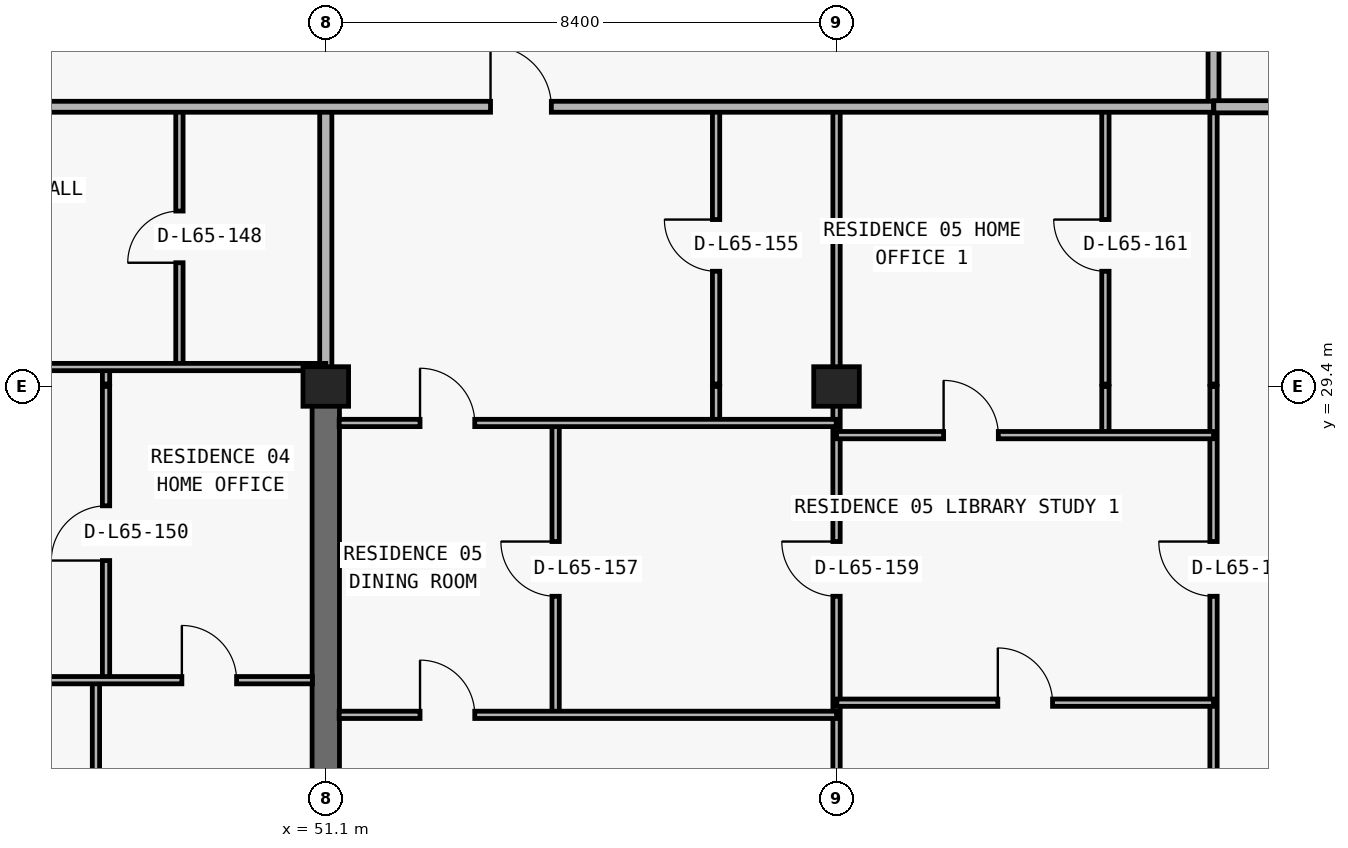
"""IFC4 building model, lengths in metres.
Left out: names, types, materials, properties, quantities, classifications, styles, units other than length and angle.
Written with IfcOpenShell. Run it as: python <this file> out.ifc"""

import sys

from ifc_helpers import new_model, si_unit, direction, frame, frame_2d, origin, origin_2d, place, context, subcontext, project, spatial, rectangle, extrude, element, fill, save


model = new_model("IFC4")
c1 = context("Model", 3, precision=1e-05, world=origin(), true_north=direction((0.0, 1.0)))
c2 = subcontext(c1, "Body", "Model", "MODEL_VIEW")
j1 = project(units=[si_unit("LENGTHUNIT", "METRE"), si_unit("PLANEANGLEUNIT", "RADIAN")], contexts=[c1])
p1 = place(None, origin())
s1 = spatial("IfcSite", under=j1, at=p1, CompositionType="ELEMENT")
p2 = place(p1, origin())
s2 = spatial("IfcBuilding", under=s1, at=p2, CompositionType="ELEMENT")
p3 = place(p2, frame((0.0, 0.0, 233.1)))
s3 = spatial("IfcBuildingStorey", under=s2, at=p3, CompositionType="ELEMENT", Elevation=233.1)
for number, where, z_axis, x_axis in (
    (1, (51.1, 29.4, 0.0), (0.0, 0.0, 1.0), (1.0, 0.0, 0.0)),
    (2, (59.5, 29.4, 0.0), (0.0, 0.0, 1.0), (1.0, 0.0, 0.0)),
):
    element("IfcColumn", number, at=place(p3, frame(where, z_axis=z_axis, x_axis=x_axis)), inside=s3, PredefinedType="COLUMN", context=c2, shape_type="SweptSolid", body=[
        extrude(rectangle(XDim=0.75, YDim=0.65, at=origin_2d()), origin(), (0.0, 0.0, 1.0), 3.05),
    ])
p4 = place(p3, frame((51.1, 20.8, 0.0), z_axis=(0.0, 0.0, 1.0), x_axis=(0.0, 1.0, 0.0)))
e3 = element("IfcWall", 3, at=p4, inside=s3, PredefinedType="SHEAR", context=c2, shape_type="SweptSolid", body=[
    extrude(rectangle(XDim=8.6, YDim=0.45, at=frame_2d((4.3, 0.0))), origin(), (0.0, 0.0, 1.0), 3.05),
])
p5 = place(p3, frame((47.32, 13.34, 0.0), z_axis=(0.0, 0.0, 1.0), x_axis=(0.0, 1.0, 0.0)))
e4 = element("IfcWall", 4, at=p5, inside=s3, PredefinedType="PARTITIONING", context=c2, shape_type="SweptSolid", body=[
    extrude(rectangle(XDim=11.23, YDim=0.12, at=frame_2d((5.615, 0.0))), origin(), (0.0, 0.0, 1.0), 3.05),
])
p6 = place(p3, frame((47.486, 24.575, 0.0), z_axis=(0.0, 0.0, 1.0), x_axis=(0.0, 1.0, 0.0)))
e5 = element("IfcWall", 5, at=p6, inside=s3, PredefinedType="PARTITIONING", context=c2, shape_type="SweptSolid", body=[
    extrude(rectangle(XDim=4.825, YDim=0.12, at=frame_2d((2.413, 0.0))), origin(), (0.0, 0.0, 1.0), 3.05),
])
p7 = place(p6, frame((1.962, 0.0, 0.0)))
e6 = element("IfcOpeningElement", 6, at=p7, cuts=e5, PredefinedType="OPENING", context=c2, shape_type="SweptSolid", body=[
    extrude(rectangle(XDim=0.9, YDim=2.15, at=frame_2d((0.45, 1.075))), frame((0.0, 0.07, 0.0), z_axis=(0.0, -1.0, 0.0), x_axis=(1.0, 0.0, 0.0)), (0.0, 0.0, 1.0), 0.14),
])
p8 = place(p3, frame((47.486, 29.44, 0.0), z_axis=(0.0, 0.0, 1.0), x_axis=(0.0, 1.0, 0.0)))
e7 = element("IfcWall", 7, at=p8, inside=s3, PredefinedType="PARTITIONING", context=c2, shape_type="SweptSolid", body=[
    extrude(rectangle(XDim=0.28, YDim=0.12, at=frame_2d((0.14, 0.0))), origin(), (0.0, 0.0, 1.0), 3.05),
])
p9 = place(p3, frame((48.693, 29.72, 0.0), z_axis=(0.0, 0.0, 1.0), x_axis=(0.0, 1.0, 0.0)))
e8 = element("IfcWall", 8, at=p9, inside=s3, PredefinedType="PARTITIONING", context=c2, shape_type="SweptSolid", body=[
    extrude(rectangle(XDim=4.28, YDim=0.12, at=frame_2d((2.14, 0.0))), origin(), (0.0, 0.0, 1.0), 3.05),
])
p10 = place(p9, frame((1.715, 0.0, 0.0)))
e9 = element("IfcOpeningElement", 9, at=p10, cuts=e8, PredefinedType="OPENING", context=c2, shape_type="SweptSolid", body=[
    extrude(rectangle(XDim=0.85, YDim=2.1, at=frame_2d((0.425, 1.05))), frame((0.0, 0.07, 0.0), z_axis=(0.0, -1.0, 0.0), x_axis=(1.0, 0.0, 0.0)), (0.0, 0.0, 1.0), 0.14),
])
p11 = place(p3, frame((51.1, 29.44, 0.0), z_axis=(0.0, 0.0, 1.0), x_axis=(0.0, 1.0, 0.0)))
e10 = element("IfcWall", 10, at=p11, inside=s3, PredefinedType="PARTITIONING", context=c2, shape_type="SweptSolid", body=[
    extrude(rectangle(XDim=4.56, YDim=0.2, at=frame_2d((2.28, 0.0))), origin(), (0.0, 0.0, 1.0), 2.335),
])
p12 = place(p3, frame((54.88, 24.0, 0.0), z_axis=(0.0, 0.0, 1.0), x_axis=(0.0, 1.0, 0.0)))
e11 = element("IfcWall", 11, at=p12, inside=s3, PredefinedType="PARTITIONING", context=c2, shape_type="SweptSolid", body=[
    extrude(rectangle(XDim=4.8, YDim=0.12, at=frame_2d((2.4, 0.0))), origin(), (0.0, 0.0, 1.0), 3.05),
])
p13 = place(p12, frame((1.95, 0.0, 0.0)))
e12 = element("IfcOpeningElement", 12, at=p13, cuts=e11, PredefinedType="OPENING", context=c2, shape_type="SweptSolid", body=[
    extrude(rectangle(XDim=0.9, YDim=2.15, at=frame_2d((0.45, 1.075))), frame((0.0, 0.07, 0.0), z_axis=(0.0, -1.0, 0.0), x_axis=(1.0, 0.0, 0.0)), (0.0, 0.0, 1.0), 0.14),
])
p14 = place(p3, frame((57.519, 28.8, 0.0), z_axis=(0.0, 0.0, 1.0), x_axis=(0.0, 1.0, 0.0)))
e13 = element("IfcWall", 13, at=p14, inside=s3, PredefinedType="PARTITIONING", context=c2, shape_type="SweptSolid", body=[
    extrude(rectangle(XDim=0.6, YDim=0.12, at=frame_2d((0.3, 0.0))), origin(), (0.0, 0.0, 1.0), 2.629),
])
p15 = place(p3, frame((57.519, 29.44, 0.0), z_axis=(0.0, 0.0, 1.0), x_axis=(0.0, 1.0, 0.0)))
e14 = element("IfcWall", 14, at=p15, inside=s3, PredefinedType="PARTITIONING", context=c2, shape_type="SweptSolid", body=[
    extrude(rectangle(XDim=4.56, YDim=0.12, at=frame_2d((2.28, 0.0))), origin(), (0.0, 0.0, 1.0), 3.05),
])
p16 = place(p15, frame((1.855, 0.0, 0.0)))
e15 = element("IfcOpeningElement", 15, at=p16, cuts=e14, PredefinedType="OPENING", context=c2, shape_type="SweptSolid", body=[
    extrude(rectangle(XDim=0.85, YDim=2.1, at=frame_2d((0.425, 1.05))), frame((0.0, 0.07, 0.0), z_axis=(0.0, -1.0, 0.0), x_axis=(1.0, 0.0, 0.0)), (0.0, 0.0, 1.0), 0.14),
])
p17 = place(p3, frame((59.5, 13.34, 0.0), z_axis=(0.0, 0.0, 1.0), x_axis=(0.0, 1.0, 0.0)))
e16 = element("IfcWall", 16, at=p17, inside=s3, PredefinedType="PARTITIONING", context=c2, shape_type="SweptSolid", body=[
    extrude(rectangle(XDim=16.06, YDim=0.12, at=frame_2d((8.03, 0.0))), origin(), (0.0, 0.0, 1.0), 2.263),
])
p18 = place(p17, frame((12.61, 0.0, 0.0)))
e17 = element("IfcOpeningElement", 17, at=p18, cuts=e16, PredefinedType="OPENING", context=c2, shape_type="SweptSolid", body=[
    extrude(rectangle(XDim=0.9, YDim=2.15, at=frame_2d((0.45, 1.075))), frame((0.0, 0.07, 0.0), z_axis=(0.0, -1.0, 0.0), x_axis=(1.0, 0.0, 0.0)), (0.0, 0.0, 1.0), 0.14),
])
p19 = place(p3, frame((59.5, 29.44, 0.0), z_axis=(0.0, 0.0, 1.0), x_axis=(0.0, 1.0, 0.0)))
e18 = element("IfcWall", 18, at=p19, inside=s3, PredefinedType="PARTITIONING", context=c2, shape_type="SweptSolid", body=[
    extrude(rectangle(XDim=4.56, YDim=0.12, at=frame_2d((2.28, 0.0))), origin(), (0.0, 0.0, 1.0), 2.263),
])
p20 = place(p3, frame((63.922, 28.6, 0.0), z_axis=(0.0, 0.0, 1.0), x_axis=(0.0, 1.0, 0.0)))
e19 = element("IfcWall", 19, at=p20, inside=s3, PredefinedType="PARTITIONING", context=c2, shape_type="SweptSolid", body=[
    extrude(rectangle(XDim=0.8, YDim=0.12, at=frame_2d((0.4, 0.0))), origin(), (0.0, 0.0, 1.0), 2.578),
])
p21 = place(p3, frame((63.922, 29.44, 0.0), z_axis=(0.0, 0.0, 1.0), x_axis=(0.0, 1.0, 0.0)))
e20 = element("IfcWall", 20, at=p21, inside=s3, PredefinedType="PARTITIONING", context=c2, shape_type="SweptSolid", body=[
    extrude(rectangle(XDim=4.56, YDim=0.12, at=frame_2d((2.28, 0.0))), origin(), (0.0, 0.0, 1.0), 2.578),
])
p22 = place(p21, frame((1.855, 0.0, 0.0)))
e21 = element("IfcOpeningElement", 21, at=p22, cuts=e20, PredefinedType="OPENING", context=c2, shape_type="SweptSolid", body=[
    extrude(rectangle(XDim=0.85, YDim=2.1, at=frame_2d((0.425, 1.05))), frame((0.0, 0.07, 0.0), z_axis=(0.0, -1.0, 0.0), x_axis=(1.0, 0.0, 0.0)), (0.0, 0.0, 1.0), 0.14),
])
p23 = place(p3, frame((65.7, 13.42, 0.0), z_axis=(0.0, 0.0, 1.0), x_axis=(0.0, 1.0, 0.0)))
e22 = element("IfcWall", 22, at=p23, inside=s3, PredefinedType="PARTITIONING", context=c2, shape_type="SweptSolid", body=[
    extrude(rectangle(XDim=15.98, YDim=0.12, at=frame_2d((7.99, 0.0))), origin(), (0.0, 0.0, 1.0), 2.629),
])
p24 = place(p23, frame((12.53, 0.0, 0.0)))
e23 = element("IfcOpeningElement", 23, at=p24, cuts=e22, PredefinedType="OPENING", context=c2, shape_type="SweptSolid", body=[
    extrude(rectangle(XDim=0.9, YDim=2.15, at=frame_2d((0.45, 1.075))), frame((0.0, 0.07, 0.0), z_axis=(0.0, -1.0, 0.0), x_axis=(1.0, 0.0, 0.0)), (0.0, 0.0, 1.0), 0.14),
])
p25 = place(p3, frame((65.7, 29.44, 0.0), z_axis=(0.0, 0.0, 1.0), x_axis=(0.0, 1.0, 0.0)))
e24 = element("IfcWall", 24, at=p25, inside=s3, PredefinedType="PARTITIONING", context=c2, shape_type="SweptSolid", body=[
    extrude(rectangle(XDim=4.56, YDim=0.12, at=frame_2d((2.28, 0.0))), origin(), (0.0, 0.0, 1.0), 2.629),
])
p26 = place(p3, frame((65.7, 34.005, 0.0), z_axis=(0.0, 0.0, 1.0), x_axis=(0.0, 1.0, 0.0)))
e25 = element("IfcWall", 25, at=p26, inside=s3, PredefinedType="PARTITIONING", context=c2, shape_type="SweptSolid", body=[
    extrude(rectangle(XDim=2.995, YDim=0.18, at=frame_2d((1.498, 0.0))), origin(), (0.0, 0.0, 1.0), 2.629),
])
p27 = place(p3, frame((51.32, 24.0, 0.0), z_axis=(0.0, 0.0, 1.0), x_axis=(1.0, 0.0, 0.0)))
e26 = element("IfcWall", 26, at=p27, inside=s3, PredefinedType="PARTITIONING", context=c2, shape_type="SweptSolid", body=[
    extrude(rectangle(XDim=8.18, YDim=0.12, at=frame_2d((4.09, 0.0))), origin(), (0.0, 0.0, 1.0), 3.05),
])
p28 = place(p27, frame((1.33, 0.0, 0.0)))
e27 = element("IfcOpeningElement", 27, at=p28, cuts=e26, PredefinedType="OPENING", context=c2, shape_type="SweptSolid", body=[
    extrude(rectangle(XDim=0.9, YDim=2.15, at=frame_2d((0.45, 1.075))), frame((0.0, 0.07, 0.0), z_axis=(0.0, -1.0, 0.0), x_axis=(1.0, 0.0, 0.0)), (0.0, 0.0, 1.0), 0.14),
])
p29 = place(p3, frame((59.505, 24.2, 0.0), z_axis=(0.0, 0.0, 1.0), x_axis=(1.0, 0.0, 0.0)))
e28 = element("IfcWall", 28, at=p29, inside=s3, PredefinedType="PARTITIONING", context=c2, shape_type="SweptSolid", body=[
    extrude(rectangle(XDim=6.195, YDim=0.12, at=frame_2d((3.098, 0.0))), origin(), (0.0, 0.0, 1.0), 3.05),
])
p30 = place(p29, frame((2.647, 0.0, 0.0)))
e29 = element("IfcOpeningElement", 29, at=p30, cuts=e28, PredefinedType="OPENING", context=c2, shape_type="SweptSolid", body=[
    extrude(rectangle(XDim=0.9, YDim=2.15, at=frame_2d((0.45, 1.075))), frame((0.0, 0.07, 0.0), z_axis=(0.0, -1.0, 0.0), x_axis=(1.0, 0.0, 0.0)), (0.0, 0.0, 1.0), 0.14),
])
p31 = place(p3, frame((42.7, 24.57, 0.0), z_axis=(0.0, 0.0, 1.0), x_axis=(1.0, 0.0, 0.0)))
e30 = element("IfcWall", 30, at=p31, inside=s3, PredefinedType="PARTITIONING", context=c2, shape_type="SweptSolid", body=[
    extrude(rectangle(XDim=8.18, YDim=0.12, at=frame_2d((4.09, 0.0))), origin(), (0.0, 0.0, 1.0), 3.05),
])
p32 = place(p31, frame((1.86, 0.0, 0.0)))
e31 = element("IfcOpeningElement", 31, at=p32, cuts=e30, PredefinedType="OPENING", context=c2, shape_type="SweptSolid", body=[
    extrude(rectangle(XDim=0.9, YDim=2.15, at=frame_2d((0.45, 1.075))), frame((0.0, 0.07, 0.0), z_axis=(0.0, -1.0, 0.0), x_axis=(1.0, 0.0, 0.0)), (0.0, 0.0, 1.0), 0.14),
])
p33 = place(p31, frame((6.033, 0.0, 0.0)))
e32 = element("IfcOpeningElement", 32, at=p33, cuts=e30, PredefinedType="OPENING", context=c2, shape_type="SweptSolid", body=[
    extrude(rectangle(XDim=0.9, YDim=2.15, at=frame_2d((0.45, 1.075))), frame((0.0, 0.07, 0.0), z_axis=(0.0, -1.0, 0.0), x_axis=(1.0, 0.0, 0.0)), (0.0, 0.0, 1.0), 0.14),
])
p34 = place(p3, frame((59.5, 28.6, 0.0), z_axis=(0.0, 0.0, 1.0), x_axis=(1.0, 0.0, 0.0)))
e33 = element("IfcWall", 33, at=p34, inside=s3, PredefinedType="PARTITIONING", context=c2, shape_type="SweptSolid", body=[
    extrude(rectangle(XDim=6.2, YDim=0.12, at=frame_2d((3.1, 0.0))), origin(), (0.0, 0.0, 1.0), 3.05),
])
p35 = place(p34, frame((1.761, 0.0, 0.0)))
e34 = element("IfcOpeningElement", 34, at=p35, cuts=e33, PredefinedType="OPENING", context=c2, shape_type="SweptSolid", body=[
    extrude(rectangle(XDim=0.9, YDim=2.15, at=frame_2d((0.45, 1.075))), frame((0.0, 0.07, 0.0), z_axis=(0.0, -1.0, 0.0), x_axis=(1.0, 0.0, 0.0)), (0.0, 0.0, 1.0), 0.14),
])
p36 = place(p3, frame((51.32, 28.8, 0.0), z_axis=(0.0, 0.0, 1.0), x_axis=(1.0, 0.0, 0.0)))
e35 = element("IfcWall", 35, at=p36, inside=s3, PredefinedType="PARTITIONING", context=c2, shape_type="SweptSolid", body=[
    extrude(rectangle(XDim=8.175, YDim=0.12, at=frame_2d((4.087, 0.0))), origin(), (0.0, 0.0, 1.0), 3.05),
])
p37 = place(p36, frame((1.33, 0.0, 0.0)))
e36 = element("IfcOpeningElement", 36, at=p37, cuts=e35, PredefinedType="OPENING", context=c2, shape_type="SweptSolid", body=[
    extrude(rectangle(XDim=0.9, YDim=2.15, at=frame_2d((0.45, 1.075))), frame((0.0, 0.07, 0.0), z_axis=(0.0, -1.0, 0.0), x_axis=(1.0, 0.0, 0.0)), (0.0, 0.0, 1.0), 0.14),
])
p38 = place(p3, frame((42.7, 29.72, 0.0), z_axis=(0.0, 0.0, 1.0), x_axis=(1.0, 0.0, 0.0)))
e37 = element("IfcWall", 37, at=p38, inside=s3, PredefinedType="PARTITIONING", context=c2, shape_type="SweptSolid", body=[
    extrude(rectangle(XDim=8.4, YDim=0.12, at=frame_2d((4.2, 0.0))), origin(), (0.0, 0.0, 1.0), 2.263),
])
p39 = place(p38, frame((1.943, 0.0, 0.0)))
e38 = element("IfcOpeningElement", 38, at=p39, cuts=e37, PredefinedType="OPENING", context=c2, shape_type="SweptSolid", body=[
    extrude(rectangle(XDim=0.9, YDim=2.15, at=frame_2d((0.45, 1.075))), frame((0.0, 0.07, 0.0), z_axis=(0.0, -1.0, 0.0), x_axis=(1.0, 0.0, 0.0)), (0.0, 0.0, 1.0), 0.14),
])
p40 = place(p3, frame((31.4, 34.0, 0.0), z_axis=(0.0, 0.0, 1.0), x_axis=(1.0, 0.0, 0.0)))
e39 = element("IfcWall", 39, at=p40, inside=s3, PredefinedType="PARTITIONING", context=c2, shape_type="SweptSolid", body=[
    extrude(rectangle(XDim=34.3, YDim=0.18, at=frame_2d((17.15, 0.0))), origin(), (0.0, 0.0, 1.0), 3.05),
])
p41 = place(p40, frame((5.948, 0.0, 0.0)))
e40 = element("IfcOpeningElement", 40, at=p41, cuts=e39, PredefinedType="OPENING", context=c2, shape_type="SweptSolid", body=[
    extrude(rectangle(XDim=1.0, YDim=2.2, at=frame_2d((0.5, 1.1))), frame((0.0, 0.1, 0.0), z_axis=(0.0, -1.0, 0.0), x_axis=(1.0, 0.0, 0.0)), (0.0, 0.0, 1.0), 0.2),
])
p42 = place(p40, frame((13.796, 0.0, 0.0)))
e41 = element("IfcOpeningElement", 41, at=p42, cuts=e39, PredefinedType="OPENING", context=c2, shape_type="SweptSolid", body=[
    extrude(rectangle(XDim=1.0, YDim=2.2, at=frame_2d((0.5, 1.1))), frame((0.0, 0.1, 0.0), z_axis=(0.0, -1.0, 0.0), x_axis=(1.0, 0.0, 0.0)), (0.0, 0.0, 1.0), 0.2),
])
p43 = place(p40, frame((22.409, 0.0, 0.0)))
e42 = element("IfcOpeningElement", 42, at=p43, cuts=e39, PredefinedType="OPENING", context=c2, shape_type="SweptSolid", body=[
    extrude(rectangle(XDim=1.0, YDim=2.2, at=frame_2d((0.5, 1.1))), frame((0.0, 0.1, 0.0), z_axis=(0.0, -1.0, 0.0), x_axis=(1.0, 0.0, 0.0)), (0.0, 0.0, 1.0), 0.2),
])
p44 = place(p3, frame((65.705, 34.0, 0.0), z_axis=(0.0, 0.0, 1.0), x_axis=(1.0, 0.0, 0.0)))
e43 = element("IfcWall", 43, at=p44, inside=s3, PredefinedType="PARTITIONING", context=c2, shape_type="SweptSolid", body=[
    extrude(rectangle(XDim=3.7, YDim=0.2, at=frame_2d((1.85, 0.0))), origin(), (0.0, 0.0, 1.0), 3.05),
])
p45 = place(p10, origin())
e44 = element("IfcDoor", 44, at=p45, inside=s3, OperationType="SINGLE_SWING_LEFT", PredefinedType="DOOR", context=c2, shape_type="SweptSolid", body=[
    extrude(rectangle(XDim=0.85, YDim=2.1, at=frame_2d((0.425, 1.05))), frame((0.0, 0.025, 0.0), z_axis=(0.0, -1.0, 0.0), x_axis=(1.0, 0.0, 0.0)), (0.0, 0.0, 1.0), 0.05),
])
fill(e9, e44)
p46 = place(p7, origin())
e45 = element("IfcDoor", 45, at=p46, inside=s3, OperationType="SINGLE_SWING_LEFT", PredefinedType="DOOR", context=c2, shape_type="SweptSolid", body=[
    extrude(rectangle(XDim=0.9, YDim=2.15, at=frame_2d((0.45, 1.075))), frame((0.0, 0.025, 0.0), z_axis=(0.0, -1.0, 0.0), x_axis=(1.0, 0.0, 0.0)), (0.0, 0.0, 1.0), 0.05),
])
fill(e6, e45)
p47 = place(p33, origin())
e46 = element("IfcDoor", 46, at=p47, inside=s3, OperationType="SINGLE_SWING_LEFT", PredefinedType="DOOR", context=c2, shape_type="SweptSolid", body=[
    extrude(rectangle(XDim=0.9, YDim=2.15, at=frame_2d((0.45, 1.075))), frame((0.0, 0.025, 0.0), z_axis=(0.0, -1.0, 0.0), x_axis=(1.0, 0.0, 0.0)), (0.0, 0.0, 1.0), 0.05),
])
fill(e32, e46)
p48 = place(p43, origin())
e47 = element("IfcDoor", 47, at=p48, inside=s3, OperationType="SINGLE_SWING_LEFT", PredefinedType="DOOR", context=c2, shape_type="SweptSolid", body=[
    extrude(rectangle(XDim=1.0, YDim=2.2, at=frame_2d((0.5, 1.1))), frame((0.0, 0.025, 0.0), z_axis=(0.0, -1.0, 0.0), x_axis=(1.0, 0.0, 0.0)), (0.0, 0.0, 1.0), 0.05),
])
fill(e42, e47)
p49 = place(p16, origin())
e48 = element("IfcDoor", 48, at=p49, inside=s3, OperationType="SINGLE_SWING_RIGHT", PredefinedType="DOOR", context=c2, shape_type="SweptSolid", body=[
    extrude(rectangle(XDim=0.85, YDim=2.1, at=frame_2d((0.425, 1.05))), frame((0.0, 0.025, 0.0), z_axis=(0.0, -1.0, 0.0), x_axis=(1.0, 0.0, 0.0)), (0.0, 0.0, 1.0), 0.05),
])
fill(e15, e48)
p50 = place(p37, origin())
e49 = element("IfcDoor", 49, at=p50, inside=s3, OperationType="SINGLE_SWING_LEFT", PredefinedType="DOOR", context=c2, shape_type="SweptSolid", body=[
    extrude(rectangle(XDim=0.9, YDim=2.15, at=frame_2d((0.45, 1.075))), frame((0.0, 0.025, 0.0), z_axis=(0.0, -1.0, 0.0), x_axis=(1.0, 0.0, 0.0)), (0.0, 0.0, 1.0), 0.05),
])
fill(e36, e49)
p51 = place(p13, origin())
e50 = element("IfcDoor", 50, at=p51, inside=s3, OperationType="SINGLE_SWING_RIGHT", PredefinedType="DOOR", context=c2, shape_type="SweptSolid", body=[
    extrude(rectangle(XDim=0.9, YDim=2.15, at=frame_2d((0.45, 1.075))), frame((0.0, 0.025, 0.0), z_axis=(0.0, -1.0, 0.0), x_axis=(1.0, 0.0, 0.0)), (0.0, 0.0, 1.0), 0.05),
])
fill(e12, e50)
p52 = place(p28, origin())
e51 = element("IfcDoor", 51, at=p52, inside=s3, OperationType="SINGLE_SWING_LEFT", PredefinedType="DOOR", context=c2, shape_type="SweptSolid", body=[
    extrude(rectangle(XDim=0.9, YDim=2.15, at=frame_2d((0.45, 1.075))), frame((0.0, 0.025, 0.0), z_axis=(0.0, -1.0, 0.0), x_axis=(1.0, 0.0, 0.0)), (0.0, 0.0, 1.0), 0.05),
])
fill(e27, e51)
p53 = place(p18, origin())
e52 = element("IfcDoor", 52, at=p53, inside=s3, OperationType="SINGLE_SWING_RIGHT", PredefinedType="DOOR", context=c2, shape_type="SweptSolid", body=[
    extrude(rectangle(XDim=0.9, YDim=2.15, at=frame_2d((0.45, 1.075))), frame((0.0, 0.025, 0.0), z_axis=(0.0, -1.0, 0.0), x_axis=(1.0, 0.0, 0.0)), (0.0, 0.0, 1.0), 0.05),
])
fill(e17, e52)
p54 = place(p35, origin())
e53 = element("IfcDoor", 53, at=p54, inside=s3, OperationType="SINGLE_SWING_LEFT", PredefinedType="DOOR", context=c2, shape_type="SweptSolid", body=[
    extrude(rectangle(XDim=0.9, YDim=2.15, at=frame_2d((0.45, 1.075))), frame((0.0, 0.025, 0.0), z_axis=(0.0, -1.0, 0.0), x_axis=(1.0, 0.0, 0.0)), (0.0, 0.0, 1.0), 0.05),
])
fill(e34, e53)
p55 = place(p22, origin())
e54 = element("IfcDoor", 54, at=p55, inside=s3, OperationType="SINGLE_SWING_RIGHT", PredefinedType="DOOR", context=c2, shape_type="SweptSolid", body=[
    extrude(rectangle(XDim=0.85, YDim=2.1, at=frame_2d((0.425, 1.05))), frame((0.0, 0.025, 0.0), z_axis=(0.0, -1.0, 0.0), x_axis=(1.0, 0.0, 0.0)), (0.0, 0.0, 1.0), 0.05),
])
fill(e21, e54)
p56 = place(p30, origin())
e55 = element("IfcDoor", 55, at=p56, inside=s3, OperationType="SINGLE_SWING_LEFT", PredefinedType="DOOR", context=c2, shape_type="SweptSolid", body=[
    extrude(rectangle(XDim=0.9, YDim=2.15, at=frame_2d((0.45, 1.075))), frame((0.0, 0.025, 0.0), z_axis=(0.0, -1.0, 0.0), x_axis=(1.0, 0.0, 0.0)), (0.0, 0.0, 1.0), 0.05),
])
fill(e29, e55)
p57 = place(p24, origin())
e56 = element("IfcDoor", 56, at=p57, inside=s3, OperationType="SINGLE_SWING_RIGHT", PredefinedType="DOOR", context=c2, shape_type="SweptSolid", body=[
    extrude(rectangle(XDim=0.9, YDim=2.15, at=frame_2d((0.45, 1.075))), frame((0.0, 0.025, 0.0), z_axis=(0.0, -1.0, 0.0), x_axis=(1.0, 0.0, 0.0)), (0.0, 0.0, 1.0), 0.05),
])
fill(e23, e56)
save(model, sys.argv[1])
